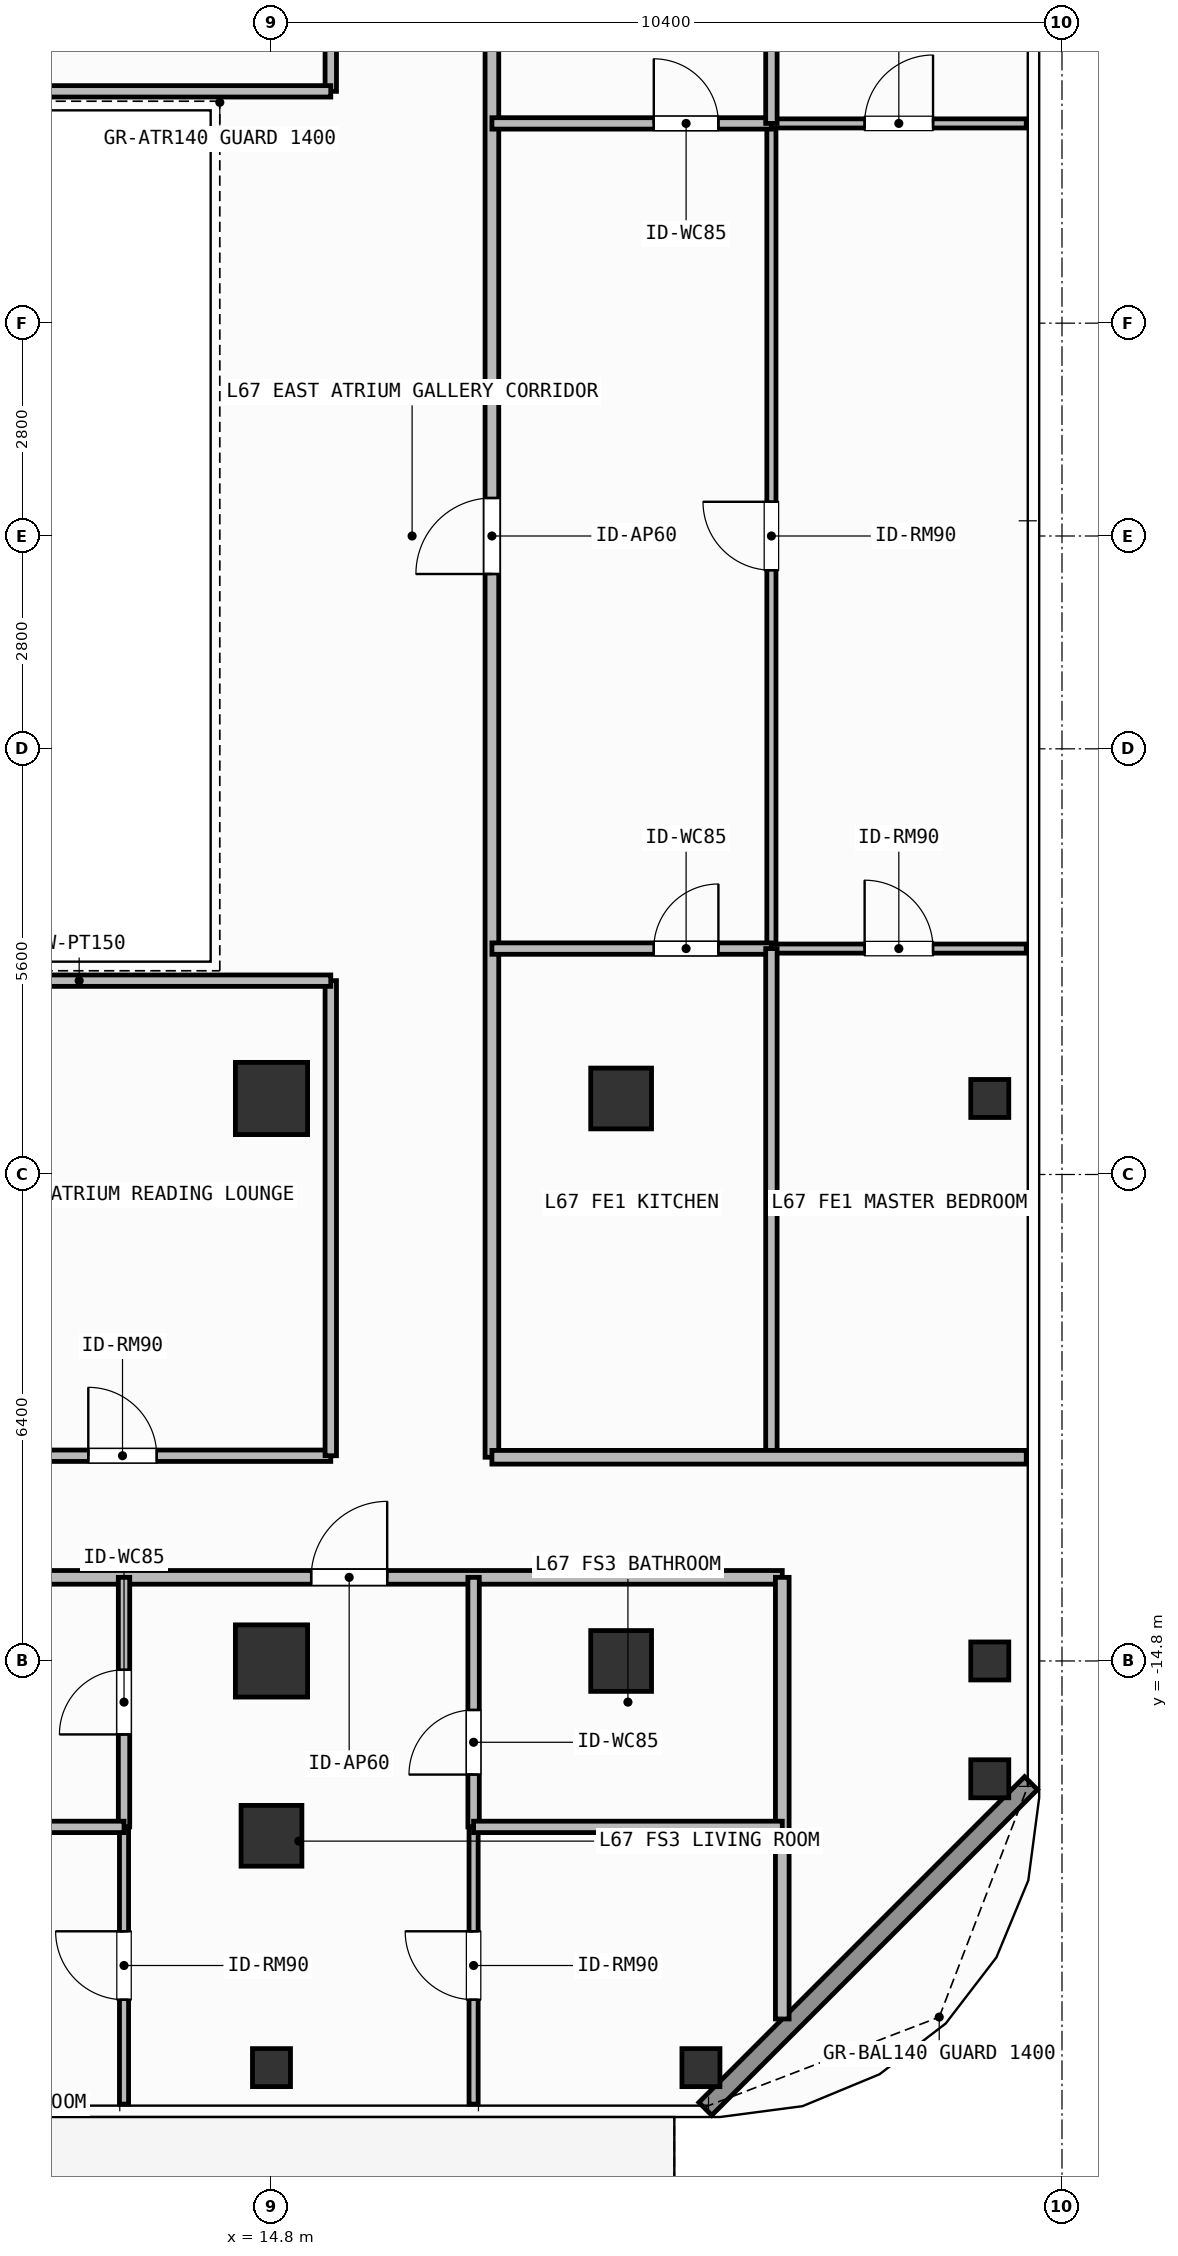
"""IFC4 building model, lengths in metres.
Left out: names, types, materials, properties, quantities, classifications, styles, units other than length and angle.
Written with IfcOpenShell. Run it as: python <this file> out.ifc"""

import sys

from ifc_helpers import new_model, si_unit, direction, frame, frame_2d, origin, origin_2d, place, context, subcontext, project, spatial, rectangle, hollow_rectangle, extrude, element, fill, save


model = new_model("IFC4")
c1 = context("Model", 3, precision=1e-05, world=origin(), true_north=direction((0.0, 1.0)))
c2 = subcontext(c1, "Body", "Model", "MODEL_VIEW")
j1 = project(units=[si_unit("LENGTHUNIT", "METRE"), si_unit("PLANEANGLEUNIT", "RADIAN")], contexts=[c1])
p1 = place(None, origin())
s1 = spatial("IfcSite", under=j1, at=p1, CompositionType="ELEMENT")
p2 = place(p1, origin())
s2 = spatial("IfcBuilding", under=s1, at=p2, CompositionType="ELEMENT")
p3 = place(p2, frame((0.0, 0.0, 274.2)))
s3 = spatial("IfcBuildingStorey", under=s2, at=p3, CompositionType="ELEMENT", Elevation=274.2)
for number, where, z_axis, x_axis in (
    (1, (14.8, -14.8, 0.0), (0.0, 0.0, 1.0), (1.0, 0.0, 0.0)),
    (2, (14.8, -7.4, 0.0), (0.0, 0.0, 1.0), (1.0, 0.0, 0.0)),
):
    element("IfcColumn", number, at=place(p3, frame(where, z_axis=z_axis, x_axis=x_axis)), inside=s3, PredefinedType="COLUMN", context=c2, shape_type="SweptSolid", body=[
        extrude(rectangle(XDim=0.95, YDim=0.95, at=origin_2d()), origin(), (0.0, 0.0, 1.0), 3.9),
    ])
for number, where, z_axis, x_axis in (
    (3, (19.4, -14.8, 0.0), (0.0, 0.0, 1.0), (1.0, 0.0, 0.0)),
    (4, (19.4, -7.4, 0.0), (0.0, 0.0, 1.0), (1.0, 0.0, 0.0)),
    (5, (14.8, -17.1, 0.0), (0.0, 0.0, 1.0), (1.0, 0.0, 0.0)),
):
    element("IfcColumn", number, at=place(p3, frame(where, z_axis=z_axis, x_axis=x_axis)), inside=s3, PredefinedType="COLUMN", context=c2, shape_type="SweptSolid", body=[
        extrude(hollow_rectangle(XDim=0.8, YDim=0.8, WallThickness=0.036, at=origin_2d()), origin(), (0.0, 0.0, 1.0), 3.9),
    ])
for number, where, z_axis, x_axis in (
    (6, (20.45, -20.15, 0.0), (0.0, 0.0, 1.0), (1.0, 0.0, 0.0)),
    (7, (24.25, -16.35, 0.0), (0.0, 0.0, 1.0), (1.0, 0.0, 0.0)),
    (8, (14.8, -20.15, 0.0), (0.0, 0.0, 1.0), (1.0, 0.0, 0.0)),
    (9, (24.25, -14.8, 0.0), (0.0, 0.0, 1.0), (1.0, 0.0, 0.0)),
    (10, (24.25, -7.4, 0.0), (0.0, 0.0, 1.0), (1.0, 0.0, 0.0)),
):
    element("IfcColumn", number, at=place(p3, frame(where, z_axis=z_axis, x_axis=x_axis)), inside=s3, PredefinedType="COLUMN", context=c2, shape_type="SweptSolid", body=[
        extrude(hollow_rectangle(XDim=0.5, YDim=0.5, WallThickness=0.025, at=origin_2d()), origin(), (0.0, 0.0, 1.0), 3.9),
    ])
p4 = place(p3, frame((24.792, -16.408, 0.0), z_axis=(0.0, 0.0, 1.0), x_axis=(-0.707126925818, -0.707086635981, 0.0)))
e11 = element("IfcWall", 11, at=p4, inside=s3, PredefinedType="SOLIDWALL", context=c2, shape_type="SweptSolid", body=[
    extrude(rectangle(XDim=6.06, YDim=0.24, at=frame_2d((3.03, 0.0))), origin(), (0.0, 0.0, 1.0), 3.68),
])
p5 = place(p3, frame((10.1, -12.1, 0.0), z_axis=(0.0, 0.0, 1.0), x_axis=(1.0, 0.0, 0.0)))
e12 = element("IfcWall", 12, at=p5, inside=s3, PredefinedType="PARTITIONING", context=c2, shape_type="SweptSolid", body=[
    extrude(rectangle(XDim=5.48, YDim=0.15, at=frame_2d((2.74, 0.0))), origin(), (0.0, 0.0, 1.0), 3.68),
])
p6 = place(p5, frame((2.29, 0.0, 0.0)))
e13 = element("IfcOpeningElement", 13, at=p6, cuts=e12, PredefinedType="OPENING", context=c2, shape_type="SweptSolid", body=[
    extrude(rectangle(XDim=0.9, YDim=2.1, at=frame_2d((0.45, 1.05))), frame((0.0, 0.085, 0.0), z_axis=(0.0, -1.0, 0.0), x_axis=(1.0, 0.0, 0.0)), (0.0, 0.0, 1.0), 0.17),
])
p7 = place(p3, frame((8.505, -13.7, 0.0), z_axis=(0.0, 0.0, 1.0), x_axis=(1.0, 0.0, 0.0)))
e14 = element("IfcWall", 14, at=p7, inside=s3, PredefinedType="PARTITIONING", context=c2, shape_type="SweptSolid", body=[
    extrude(rectangle(XDim=13.015, YDim=0.18, at=frame_2d((6.508, 0.0))), origin(), (0.0, 0.0, 1.0), 3.68),
])
p8 = place(p7, frame((6.817, 0.0, 0.0)))
e15 = element("IfcOpeningElement", 15, at=p8, cuts=e14, PredefinedType="OPENING", context=c2, shape_type="SweptSolid", body=[
    extrude(rectangle(XDim=1.0, YDim=2.2, at=frame_2d((0.5, 1.1))), frame((0.0, 0.1, 0.0), z_axis=(0.0, -1.0, 0.0), x_axis=(1.0, 0.0, 0.0)), (0.0, 0.0, 1.0), 0.2),
])
p9 = place(p3, frame((12.86, -16.983, 0.0), z_axis=(0.0, 0.0, 1.0), x_axis=(0.0, 1.0, 0.0)))
e16 = element("IfcWall", 16, at=p9, inside=s3, PredefinedType="PARTITIONING", context=c2, shape_type="SweptSolid", body=[
    extrude(rectangle(XDim=3.283, YDim=0.15, at=frame_2d((1.642, 0.0))), origin(), (0.0, 0.0, 1.0), 3.68),
])
p10 = place(p9, frame((1.217, 0.0, 0.0)))
e17 = element("IfcOpeningElement", 17, at=p10, cuts=e16, PredefinedType="OPENING", context=c2, shape_type="SweptSolid", body=[
    extrude(rectangle(XDim=0.85, YDim=2.1, at=frame_2d((0.425, 1.05))), frame((0.0, 0.085, 0.0), z_axis=(0.0, -1.0, 0.0), x_axis=(1.0, 0.0, 0.0)), (0.0, 0.0, 1.0), 0.17),
])
p11 = place(p3, frame((12.86, -20.63, 0.0), z_axis=(0.0, 0.0, 1.0), x_axis=(0.0, 1.0, 0.0)))
e18 = element("IfcWall", 18, at=p11, inside=s3, PredefinedType="PARTITIONING", context=c2, shape_type="SweptSolid", body=[
    extrude(rectangle(XDim=3.647, YDim=0.12, at=frame_2d((1.823, 0.0))), origin(), (0.0, 0.0, 1.0), 3.68),
])
p12 = place(p11, frame((1.374, 0.0, 0.0)))
e19 = element("IfcOpeningElement", 19, at=p12, cuts=e18, PredefinedType="OPENING", context=c2, shape_type="SweptSolid", body=[
    extrude(rectangle(XDim=0.9, YDim=2.1, at=frame_2d((0.45, 1.05))), frame((0.0, 0.07, 0.0), z_axis=(0.0, -1.0, 0.0), x_axis=(1.0, 0.0, 0.0)), (0.0, 0.0, 1.0), 0.14),
])
p13 = place(p3, frame((17.459, -16.983, 0.0), z_axis=(0.0, 0.0, 1.0), x_axis=(0.0, 1.0, 0.0)))
e20 = element("IfcWall", 20, at=p13, inside=s3, PredefinedType="PARTITIONING", context=c2, shape_type="SweptSolid", body=[
    extrude(rectangle(XDim=3.283, YDim=0.15, at=frame_2d((1.642, 0.0))), origin(), (0.0, 0.0, 1.0), 3.68),
])
p14 = place(p13, frame((0.688, 0.0, 0.0)))
e21 = element("IfcOpeningElement", 21, at=p14, cuts=e20, PredefinedType="OPENING", context=c2, shape_type="SweptSolid", body=[
    extrude(rectangle(XDim=0.85, YDim=2.1, at=frame_2d((0.425, 1.05))), frame((0.0, 0.085, 0.0), z_axis=(0.0, -1.0, 0.0), x_axis=(1.0, 0.0, 0.0)), (0.0, 0.0, 1.0), 0.17),
])
p15 = place(p3, frame((17.459, -20.63, 0.0), z_axis=(0.0, 0.0, 1.0), x_axis=(0.0, 1.0, 0.0)))
e22 = element("IfcWall", 22, at=p15, inside=s3, PredefinedType="PARTITIONING", context=c2, shape_type="SweptSolid", body=[
    extrude(rectangle(XDim=3.647, YDim=0.12, at=frame_2d((1.823, 0.0))), origin(), (0.0, 0.0, 1.0), 3.68),
])
p16 = place(p15, frame((1.374, 0.0, 0.0)))
e23 = element("IfcOpeningElement", 23, at=p16, cuts=e22, PredefinedType="OPENING", context=c2, shape_type="SweptSolid", body=[
    extrude(rectangle(XDim=0.9, YDim=2.1, at=frame_2d((0.45, 1.05))), frame((0.0, 0.07, 0.0), z_axis=(0.0, -1.0, 0.0), x_axis=(1.0, 0.0, 0.0)), (0.0, 0.0, 1.0), 0.14),
])
p17 = place(p3, frame((17.7, -12.12, 0.0), z_axis=(0.0, 0.0, 1.0), x_axis=(0.0, 1.0, 0.0)))
e24 = element("IfcWall", 24, at=p17, inside=s3, PredefinedType="PARTITIONING", context=c2, shape_type="SweptSolid", body=[
    extrude(rectangle(XDim=24.24, YDim=0.18, at=frame_2d((12.12, 0.0))), origin(), (0.0, 0.0, 1.0), 3.68),
])
p18 = place(p17, frame((11.62, 0.0, 0.0)))
e25 = element("IfcOpeningElement", 25, at=p18, cuts=e24, PredefinedType="OPENING", context=c2, shape_type="SweptSolid", body=[
    extrude(rectangle(XDim=1.0, YDim=2.2, at=frame_2d((0.5, 1.1))), frame((0.0, 0.1, 0.0), z_axis=(0.0, -1.0, 0.0), x_axis=(1.0, 0.0, 0.0)), (0.0, 0.0, 1.0), 0.2),
])
p19 = place(p3, frame((21.377, -5.428, 0.0), z_axis=(0.0, 0.0, 1.0), x_axis=(0.0, 1.0, 0.0)))
e26 = element("IfcWall", 26, at=p19, inside=s3, PredefinedType="PARTITIONING", context=c2, shape_type="SweptSolid", body=[
    extrude(rectangle(XDim=10.856, YDim=0.12, at=frame_2d((5.428, 0.0))), origin(), (0.0, 0.0, 1.0), 3.68),
])
p20 = place(p19, frame((4.978, 0.0, 0.0)))
e27 = element("IfcOpeningElement", 27, at=p20, cuts=e26, PredefinedType="OPENING", context=c2, shape_type="SweptSolid", body=[
    extrude(rectangle(XDim=0.9, YDim=2.1, at=frame_2d((0.45, 1.05))), frame((0.0, 0.07, 0.0), z_axis=(0.0, -1.0, 0.0), x_axis=(1.0, 0.0, 0.0)), (0.0, 0.0, 1.0), 0.14),
])
p21 = place(p3, frame((17.7, 5.428, 0.0), z_axis=(0.0, 0.0, 1.0), x_axis=(1.0, 0.0, 0.0)))
e28 = element("IfcWall", 28, at=p21, inside=s3, PredefinedType="PARTITIONING", context=c2, shape_type="SweptSolid", body=[
    extrude(rectangle(XDim=3.677, YDim=0.15, at=frame_2d((1.838, 0.0))), origin(), (0.0, 0.0, 1.0), 3.68),
])
p22 = place(p21, frame((2.13, 0.0, 0.0)))
e29 = element("IfcOpeningElement", 29, at=p22, cuts=e28, PredefinedType="OPENING", context=c2, shape_type="SweptSolid", body=[
    extrude(rectangle(XDim=0.85, YDim=2.1, at=frame_2d((0.425, 1.05))), frame((0.0, 0.085, 0.0), z_axis=(0.0, -1.0, 0.0), x_axis=(1.0, 0.0, 0.0)), (0.0, 0.0, 1.0), 0.17),
])
p23 = place(p3, frame((17.7, -5.428, 0.0), z_axis=(0.0, 0.0, 1.0), x_axis=(1.0, 0.0, 0.0)))
e30 = element("IfcWall", 30, at=p23, inside=s3, PredefinedType="PARTITIONING", context=c2, shape_type="SweptSolid", body=[
    extrude(rectangle(XDim=3.677, YDim=0.15, at=frame_2d((1.838, 0.0))), origin(), (0.0, 0.0, 1.0), 3.68),
])
p24 = place(p23, frame((2.13, 0.0, 0.0)))
e31 = element("IfcOpeningElement", 31, at=p24, cuts=e30, PredefinedType="OPENING", context=c2, shape_type="SweptSolid", body=[
    extrude(rectangle(XDim=0.85, YDim=2.1, at=frame_2d((0.425, 1.05))), frame((0.0, 0.085, 0.0), z_axis=(0.0, -1.0, 0.0), x_axis=(1.0, 0.0, 0.0)), (0.0, 0.0, 1.0), 0.17),
])
p25 = place(p3, frame((21.377, -5.428, 0.0), z_axis=(0.0, 0.0, 1.0), x_axis=(1.0, 0.0, 0.0)))
e32 = element("IfcWall", 32, at=p25, inside=s3, PredefinedType="PARTITIONING", context=c2, shape_type="SweptSolid", body=[
    extrude(rectangle(XDim=3.353, YDim=0.12, at=frame_2d((1.677, 0.0))), origin(), (0.0, 0.0, 1.0), 3.68),
])
p26 = place(p25, frame((1.227, 0.0, 0.0)))
e33 = element("IfcOpeningElement", 33, at=p26, cuts=e32, PredefinedType="OPENING", context=c2, shape_type="SweptSolid", body=[
    extrude(rectangle(XDim=0.9, YDim=2.1, at=frame_2d((0.45, 1.05))), frame((0.0, 0.07, 0.0), z_axis=(0.0, -1.0, 0.0), x_axis=(1.0, 0.0, 0.0)), (0.0, 0.0, 1.0), 0.14),
])
p27 = place(p3, frame((21.377, 5.428, 0.0), z_axis=(0.0, 0.0, 1.0), x_axis=(1.0, 0.0, 0.0)))
e34 = element("IfcWall", 34, at=p27, inside=s3, PredefinedType="PARTITIONING", context=c2, shape_type="SweptSolid", body=[
    extrude(rectangle(XDim=3.353, YDim=0.12, at=frame_2d((1.677, 0.0))), origin(), (0.0, 0.0, 1.0), 3.68),
])
p28 = place(p27, frame((1.227, 0.0, 0.0)))
e35 = element("IfcOpeningElement", 35, at=p28, cuts=e34, PredefinedType="OPENING", context=c2, shape_type="SweptSolid", body=[
    extrude(rectangle(XDim=0.9, YDim=2.1, at=frame_2d((0.45, 1.05))), frame((0.0, 0.07, 0.0), z_axis=(0.0, -1.0, 0.0), x_axis=(1.0, 0.0, 0.0)), (0.0, 0.0, 1.0), 0.14),
])
p29 = place(p3, frame((15.58, -12.1, 0.0), z_axis=(0.0, 0.0, 1.0), x_axis=(0.0, 1.0, 0.0)))
e36 = element("IfcWall", 36, at=p29, inside=s3, PredefinedType="PARTITIONING", context=c2, shape_type="SweptSolid", body=[
    extrude(rectangle(XDim=6.25, YDim=0.15, at=frame_2d((3.125, 0.0))), origin(), (0.0, 0.0, 1.0), 3.68),
])
p30 = place(p3, frame((8.96, -5.85, 0.0), z_axis=(0.0, 0.0, 1.0), x_axis=(1.0, 0.0, 0.0)))
e37 = element("IfcWall", 37, at=p30, inside=s3, PredefinedType="PARTITIONING", context=c2, shape_type="SweptSolid", body=[
    extrude(rectangle(XDim=6.62, YDim=0.15, at=frame_2d((3.31, 0.0))), origin(), (0.0, 0.0, 1.0), 3.68),
])
p31 = place(p3, frame((15.58, 5.85, 0.0), z_axis=(0.0, 0.0, 1.0), x_axis=(0.0, 1.0, 0.0)))
e38 = element("IfcWall", 38, at=p31, inside=s3, PredefinedType="PARTITIONING", context=c2, shape_type="SweptSolid", body=[
    extrude(rectangle(XDim=6.25, YDim=0.15, at=frame_2d((3.125, 0.0))), origin(), (0.0, 0.0, 1.0), 3.68),
])
p32 = place(p3, frame((8.96, 5.85, 0.0), z_axis=(0.0, 0.0, 1.0), x_axis=(1.0, 0.0, 0.0)))
e39 = element("IfcWall", 39, at=p32, inside=s3, PredefinedType="PARTITIONING", context=c2, shape_type="SweptSolid", body=[
    extrude(rectangle(XDim=6.62, YDim=0.15, at=frame_2d((3.31, 0.0))), origin(), (0.0, 0.0, 1.0), 3.68),
])
p33 = place(p3, frame((21.52, -19.51, 0.0), z_axis=(0.0, 0.0, 1.0), x_axis=(0.0, 1.0, 0.0)))
e40 = element("IfcWall", 40, at=p33, inside=s3, PredefinedType="PARTITIONING", context=c2, shape_type="SweptSolid", body=[
    extrude(rectangle(XDim=5.81, YDim=0.18, at=frame_2d((2.905, 0.0))), origin(), (0.0, 0.0, 1.0), 3.68),
])
p34 = place(p3, frame((8.505, -16.983, 0.0), z_axis=(0.0, 0.0, 1.0), x_axis=(1.0, 0.0, 0.0)))
e41 = element("IfcWall", 41, at=p34, inside=s3, PredefinedType="PARTITIONING", context=c2, shape_type="SweptSolid", body=[
    extrude(rectangle(XDim=4.355, YDim=0.15, at=frame_2d((2.178, 0.0))), origin(), (0.0, 0.0, 1.0), 3.182),
])
p35 = place(p3, frame((17.459, -16.983, 0.0), z_axis=(0.0, 0.0, 1.0), x_axis=(1.0, 0.0, 0.0)))
e42 = element("IfcWall", 42, at=p35, inside=s3, PredefinedType="PARTITIONING", context=c2, shape_type="SweptSolid", body=[
    extrude(rectangle(XDim=4.061, YDim=0.15, at=frame_2d((2.031, 0.0))), origin(), (0.0, 0.0, 1.0), 3.68),
])
for number, where, z_axis, x_axis in (
    (43, (21.377, -12.12, 0.0), (0.0, 0.0, 1.0), (0.0, 1.0, 0.0)),
    (44, (21.377, 5.428, 0.0), (0.0, 0.0, 1.0), (0.0, 1.0, 0.0)),
):
    element("IfcWall", number, at=place(p3, frame(where, z_axis=z_axis, x_axis=x_axis)), inside=s3, PredefinedType="PARTITIONING", context=c2, shape_type="SweptSolid", body=[
        extrude(rectangle(XDim=6.692, YDim=0.15, at=frame_2d((3.346, 0.0))), origin(), (0.0, 0.0, 1.0), 3.68),
    ])
p36 = place(p3, frame((17.7, -12.12, 0.0), z_axis=(0.0, 0.0, 1.0), x_axis=(1.0, 0.0, 0.0)))
e45 = element("IfcWall", 45, at=p36, inside=s3, PredefinedType="PARTITIONING", context=c2, shape_type="SweptSolid", body=[
    extrude(rectangle(XDim=7.03, YDim=0.18, at=frame_2d((3.515, 0.0))), origin(), (0.0, 0.0, 1.0), 3.68),
])
p37 = place(p6, origin())
e46 = element("IfcDoor", 46, at=p37, inside=s3, OperationType="SINGLE_SWING_LEFT", PredefinedType="DOOR", context=c2, shape_type="SweptSolid", body=[
    extrude(rectangle(XDim=0.9, YDim=2.1, at=frame_2d((0.45, 1.05))), frame((0.0, 0.025, 0.0), z_axis=(0.0, -1.0, 0.0), x_axis=(1.0, 0.0, 0.0)), (0.0, 0.0, 1.0), 0.05),
])
fill(e13, e46)
p38 = place(p8, origin())
e47 = element("IfcDoor", 47, at=p38, inside=s3, OperationType="SINGLE_SWING_RIGHT", PredefinedType="DOOR", context=c2, shape_type="SweptSolid", body=[
    extrude(rectangle(XDim=1.0, YDim=2.2, at=frame_2d((0.5, 1.1))), frame((0.0, 0.025, 0.0), z_axis=(0.0, -1.0, 0.0), x_axis=(1.0, 0.0, 0.0)), (0.0, 0.0, 1.0), 0.05),
])
fill(e15, e47)
p39 = place(p10, origin())
e48 = element("IfcDoor", 48, at=p39, inside=s3, OperationType="SINGLE_SWING_LEFT", PredefinedType="DOOR", context=c2, shape_type="SweptSolid", body=[
    extrude(rectangle(XDim=0.85, YDim=2.1, at=frame_2d((0.425, 1.05))), frame((0.0, 0.025, 0.0), z_axis=(0.0, -1.0, 0.0), x_axis=(1.0, 0.0, 0.0)), (0.0, 0.0, 1.0), 0.05),
])
fill(e17, e48)
p40 = place(p12, origin())
e49 = element("IfcDoor", 49, at=p40, inside=s3, OperationType="SINGLE_SWING_RIGHT", PredefinedType="DOOR", context=c2, shape_type="SweptSolid", body=[
    extrude(rectangle(XDim=0.9, YDim=2.1, at=frame_2d((0.45, 1.05))), frame((0.0, 0.025, 0.0), z_axis=(0.0, -1.0, 0.0), x_axis=(1.0, 0.0, 0.0)), (0.0, 0.0, 1.0), 0.05),
])
fill(e19, e49)
p41 = place(p14, origin())
e50 = element("IfcDoor", 50, at=p41, inside=s3, OperationType="SINGLE_SWING_LEFT", PredefinedType="DOOR", context=c2, shape_type="SweptSolid", body=[
    extrude(rectangle(XDim=0.85, YDim=2.1, at=frame_2d((0.425, 1.05))), frame((0.0, 0.025, 0.0), z_axis=(0.0, -1.0, 0.0), x_axis=(1.0, 0.0, 0.0)), (0.0, 0.0, 1.0), 0.05),
])
fill(e21, e50)
p42 = place(p16, origin())
e51 = element("IfcDoor", 51, at=p42, inside=s3, OperationType="SINGLE_SWING_RIGHT", PredefinedType="DOOR", context=c2, shape_type="SweptSolid", body=[
    extrude(rectangle(XDim=0.9, YDim=2.1, at=frame_2d((0.45, 1.05))), frame((0.0, 0.025, 0.0), z_axis=(0.0, -1.0, 0.0), x_axis=(1.0, 0.0, 0.0)), (0.0, 0.0, 1.0), 0.05),
])
fill(e23, e51)
p43 = place(p18, origin())
e52 = element("IfcDoor", 52, at=p43, inside=s3, OperationType="SINGLE_SWING_LEFT", PredefinedType="DOOR", context=c2, shape_type="SweptSolid", body=[
    extrude(rectangle(XDim=1.0, YDim=2.2, at=frame_2d((0.5, 1.1))), frame((0.0, 0.025, 0.0), z_axis=(0.0, -1.0, 0.0), x_axis=(1.0, 0.0, 0.0)), (0.0, 0.0, 1.0), 0.05),
])
fill(e25, e52)
p44 = place(p20, origin())
e53 = element("IfcDoor", 53, at=p44, inside=s3, OperationType="SINGLE_SWING_RIGHT", PredefinedType="DOOR", context=c2, shape_type="SweptSolid", body=[
    extrude(rectangle(XDim=0.9, YDim=2.1, at=frame_2d((0.45, 1.05))), frame((0.0, 0.025, 0.0), z_axis=(0.0, -1.0, 0.0), x_axis=(1.0, 0.0, 0.0)), (0.0, 0.0, 1.0), 0.05),
])
fill(e27, e53)
p45 = place(p22, origin())
e54 = element("IfcDoor", 54, at=p45, inside=s3, OperationType="SINGLE_SWING_LEFT", PredefinedType="DOOR", context=c2, shape_type="SweptSolid", body=[
    extrude(rectangle(XDim=0.85, YDim=2.1, at=frame_2d((0.425, 1.05))), frame((0.0, 0.025, 0.0), z_axis=(0.0, -1.0, 0.0), x_axis=(1.0, 0.0, 0.0)), (0.0, 0.0, 1.0), 0.05),
])
fill(e29, e54)
p46 = place(p24, origin())
e55 = element("IfcDoor", 55, at=p46, inside=s3, OperationType="SINGLE_SWING_RIGHT", PredefinedType="DOOR", context=c2, shape_type="SweptSolid", body=[
    extrude(rectangle(XDim=0.85, YDim=2.1, at=frame_2d((0.425, 1.05))), frame((0.0, 0.025, 0.0), z_axis=(0.0, -1.0, 0.0), x_axis=(1.0, 0.0, 0.0)), (0.0, 0.0, 1.0), 0.05),
])
fill(e31, e55)
p47 = place(p26, origin())
e56 = element("IfcDoor", 56, at=p47, inside=s3, OperationType="SINGLE_SWING_LEFT", PredefinedType="DOOR", context=c2, shape_type="SweptSolid", body=[
    extrude(rectangle(XDim=0.9, YDim=2.1, at=frame_2d((0.45, 1.05))), frame((0.0, 0.025, 0.0), z_axis=(0.0, -1.0, 0.0), x_axis=(1.0, 0.0, 0.0)), (0.0, 0.0, 1.0), 0.05),
])
fill(e33, e56)
p48 = place(p28, origin())
e57 = element("IfcDoor", 57, at=p48, inside=s3, OperationType="SINGLE_SWING_RIGHT", PredefinedType="DOOR", context=c2, shape_type="SweptSolid", body=[
    extrude(rectangle(XDim=0.9, YDim=2.1, at=frame_2d((0.45, 1.05))), frame((0.0, 0.025, 0.0), z_axis=(0.0, -1.0, 0.0), x_axis=(1.0, 0.0, 0.0)), (0.0, 0.0, 1.0), 0.05),
])
fill(e35, e57)
save(model, sys.argv[1])
